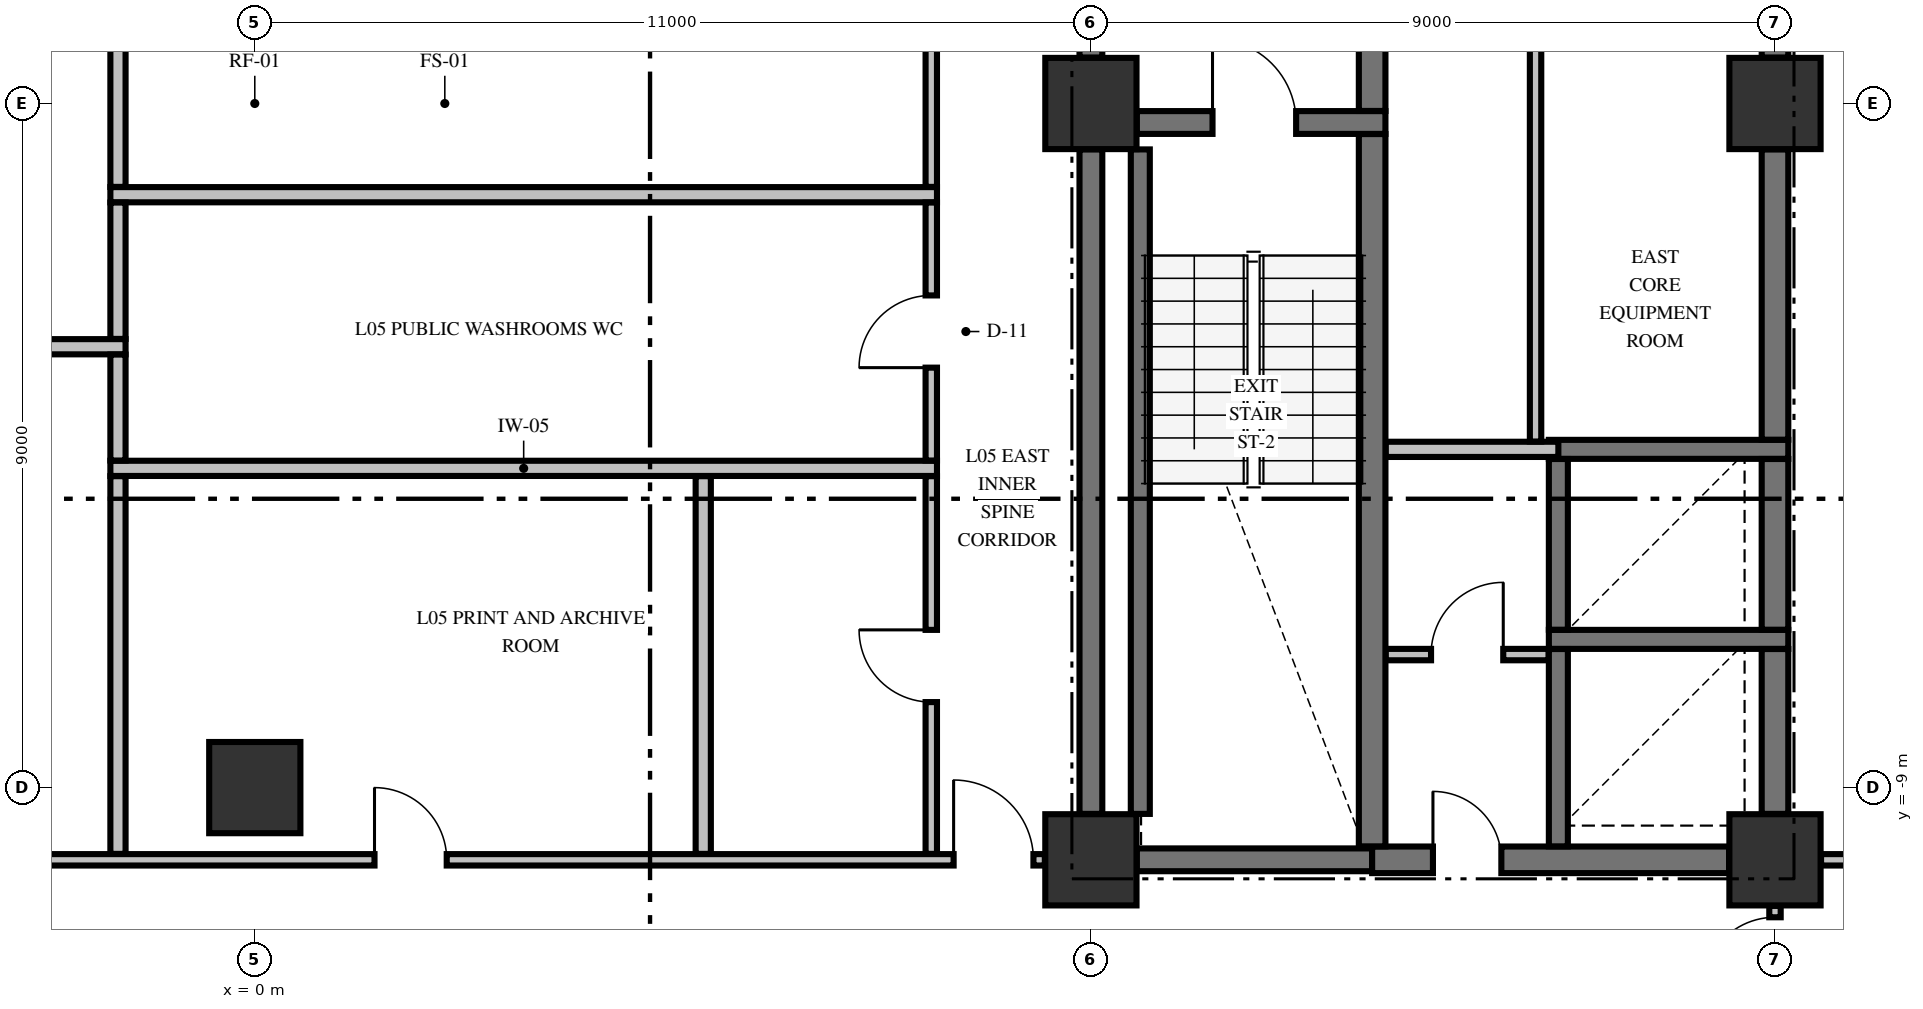
"""IFC4 building model, lengths in metres.
Left out: names, types, materials, properties, quantities, classifications, styles, units other than length and angle.
Written with IfcOpenShell. Run it as: python <this file> out.ifc"""

import sys

from ifc_helpers import new_model, si_unit, direction, frame, frame_2d, origin, origin_2d, place, context, subcontext, project, spatial, rectangle, extrude, element, fill, save


model = new_model("IFC4")
c1 = context("Model", 3, precision=1e-05, world=origin(), true_north=direction((0.0, 1.0)))
c2 = subcontext(c1, "Body", "Model", "MODEL_VIEW")
j1 = project(units=[si_unit("LENGTHUNIT", "METRE"), si_unit("PLANEANGLEUNIT", "RADIAN")], contexts=[c1])
p1 = place(None, origin())
s1 = spatial("IfcSite", under=j1, at=p1, CompositionType="ELEMENT")
p2 = place(p1, origin())
s2 = spatial("IfcBuilding", under=s1, at=p2, CompositionType="ELEMENT")
p3 = place(p2, frame((0.0, 0.0, 27.2)))
s3 = spatial("IfcBuildingStorey", under=s2, at=p3, CompositionType="ELEMENT", Elevation=27.2)
for number, where, z_axis, x_axis in (
    (1, (11.0, -9.95, -0.45), (0.0, 0.0, 1.0), (1.0, 0.0, 0.0)),
    (2, (11.0, 0.0, -0.45), (0.0, 0.0, 1.0), (1.0, 0.0, 0.0)),
    (3, (20.0, -9.95, -0.45), (0.0, 0.0, 1.0), (1.0, 0.0, 0.0)),
    (4, (0.0, -9.0, -0.45), (0.0, 0.0, 1.0), (1.0, 0.0, 0.0)),
    (5, (20.0, 0.0, -0.45), (0.0, 0.0, 1.0), (1.0, 0.0, 0.0)),
):
    element("IfcColumn", number, at=place(p3, frame(where, z_axis=z_axis, x_axis=x_axis)), inside=s3, PredefinedType="COLUMN", context=c2, shape_type="SweptSolid", body=[
        extrude(rectangle(XDim=1.2, YDim=1.2, at=origin_2d()), origin(), (0.0, 0.0, 1.0), 3.77),
    ])
p4 = place(p3, frame((11.604, -9.95, 0.0), z_axis=(0.0, 0.0, 1.0), x_axis=(1.0, 0.0, 0.0)))
e6 = element("IfcWall", 6, at=p4, inside=s3, PredefinedType="SHEAR", context=c2, shape_type="SweptSolid", body=[
    extrude(rectangle(XDim=3.096, YDim=0.3, at=frame_2d((1.548, 0.0))), origin(), (0.0, 0.0, 1.0), 3.32),
])
p5 = place(p3, frame((14.7, -9.95, 0.0), z_axis=(0.0, 0.0, 1.0), x_axis=(1.0, 0.0, 0.0)))
e7 = element("IfcWall", 7, at=p5, inside=s3, PredefinedType="SHEAR", context=c2, shape_type="SweptSolid", body=[
    extrude(rectangle(XDim=4.696, YDim=0.35, at=frame_2d((2.348, 0.0))), origin(), (0.0, 0.0, 1.0), 3.32),
])
p6 = place(p5, frame((0.8, 0.0, 0.0)))
e8 = element("IfcOpeningElement", 8, at=p6, cuts=e7, PredefinedType="OPENING", context=c2, shape_type="SweptSolid", body=[
    extrude(rectangle(XDim=0.9, YDim=2.15, at=frame_2d((0.45, 1.075))), frame((0.0, 0.185, 0.0), z_axis=(0.0, -1.0, 0.0), x_axis=(1.0, 0.0, 0.0)), (0.0, 0.0, 1.0), 0.37),
])
for number, where, z_axis, x_axis in (
    (9, (17.025, -7.05, 0.0), (0.0, 0.0, 1.0), (1.0, 0.0, 0.0)),
    (10, (17.025, -4.55, 0.0), (0.0, 0.0, 1.0), (1.0, 0.0, 0.0)),
):
    element("IfcWall", number, at=place(p3, frame(where, z_axis=z_axis, x_axis=x_axis)), inside=s3, PredefinedType="SOLIDWALL", context=c2, shape_type="SweptSolid", body=[
        extrude(rectangle(XDim=3.15, YDim=0.25, at=frame_2d((1.575, 0.0))), origin(), (0.0, 0.0, 1.0), 3.32),
    ])
p7 = place(p3, frame((11.604, -0.25, 0.0), z_axis=(0.0, 0.0, 1.0), x_axis=(1.0, 0.0, 0.0)))
e11 = element("IfcWall", 11, at=p7, inside=s3, PredefinedType="SHEAR", context=c2, shape_type="SweptSolid", body=[
    extrude(rectangle(XDim=3.271, YDim=0.3, at=frame_2d((1.635, 0.0))), origin(), (0.0, 0.0, 1.0), 3.32),
])
p8 = place(p7, frame((0.996, 0.0, 0.0)))
e12 = element("IfcOpeningElement", 12, at=p8, cuts=e11, PredefinedType="OPENING", context=c2, shape_type="SweptSolid", body=[
    extrude(rectangle(XDim=1.1, YDim=2.15, at=frame_2d((0.55, 1.075))), frame((0.0, 0.16, 0.0), z_axis=(0.0, -1.0, 0.0), x_axis=(1.0, 0.0, 0.0)), (0.0, 0.0, 1.0), 0.32),
])
p9 = place(p3, frame((-10.394, -9.95, 0.0), z_axis=(0.0, 0.0, 1.0), x_axis=(1.0, 0.0, 0.0)))
e13 = element("IfcWall", 13, at=p9, inside=s3, PredefinedType="PARTITIONING", context=c2, shape_type="SweptSolid", body=[
    extrude(rectangle(XDim=20.788, YDim=0.15, at=frame_2d((10.394, 0.0))), origin(), (0.0, 0.0, 1.0), 3.32),
])
p10 = place(p9, frame((0.15, 0.0, 0.0)))
e14 = element("IfcOpeningElement", 14, at=p10, cuts=e13, PredefinedType="OPENING", context=c2, shape_type="SweptSolid", body=[
    extrude(rectangle(XDim=1.05, YDim=2.15, at=frame_2d((0.525, 1.075))), frame((0.0, 0.085, 0.0), z_axis=(0.0, -1.0, 0.0), x_axis=(1.0, 0.0, 0.0)), (0.0, 0.0, 1.0), 0.17),
])
p11 = place(p9, frame((19.588, 0.0, 0.0)))
e15 = element("IfcOpeningElement", 15, at=p11, cuts=e13, PredefinedType="OPENING", context=c2, shape_type="SweptSolid", body=[
    extrude(rectangle(XDim=1.05, YDim=2.15, at=frame_2d((0.525, 1.075))), frame((0.0, 0.085, 0.0), z_axis=(0.0, -1.0, 0.0), x_axis=(1.0, 0.0, 0.0)), (0.0, 0.0, 1.0), 0.17),
])
p12 = place(p9, frame((11.969, 0.0, 0.0)))
e16 = element("IfcOpeningElement", 16, at=p12, cuts=e13, PredefinedType="OPENING", context=c2, shape_type="SweptSolid", body=[
    extrude(rectangle(XDim=0.95, YDim=2.15, at=frame_2d((0.475, 1.075))), frame((0.0, 0.085, 0.0), z_axis=(0.0, -1.0, 0.0), x_axis=(1.0, 0.0, 0.0)), (0.0, 0.0, 1.0), 0.17),
])
p13 = place(p3, frame((20.606, -9.95, 0.0), z_axis=(0.0, 0.0, 1.0), x_axis=(1.0, 0.0, 0.0)))
e17 = element("IfcWall", 17, at=p13, inside=s3, PredefinedType="PARTITIONING", context=c2, shape_type="SweptSolid", body=[
    extrude(rectangle(XDim=8.229, YDim=0.15, at=frame_2d((4.115, 0.0))), origin(), (0.0, 0.0, 1.0), 3.32),
])
p14 = place(p13, frame((3.394, 0.0, 0.0)))
e18 = element("IfcOpeningElement", 18, at=p14, cuts=e17, PredefinedType="OPENING", context=c2, shape_type="SweptSolid", body=[
    extrude(rectangle(XDim=1.0, YDim=2.15, at=frame_2d((0.5, 1.075))), frame((0.0, 0.085, 0.0), z_axis=(0.0, -1.0, 0.0), x_axis=(1.0, 0.0, 0.0)), (0.0, 0.0, 1.0), 0.17),
])
p15 = place(p3, frame((14.878, -7.25, 0.0), z_axis=(0.0, 0.0, 1.0), x_axis=(1.0, 0.0, 0.0)))
e19 = element("IfcWall", 19, at=p15, inside=s3, PredefinedType="PARTITIONING", context=c2, shape_type="SweptSolid", body=[
    extrude(rectangle(XDim=2.144, YDim=0.15, at=frame_2d((1.072, 0.0))), origin(), (0.0, 0.0, 1.0), 3.32),
])
p16 = place(p15, frame((0.597, 0.0, 0.0)))
e20 = element("IfcOpeningElement", 20, at=p16, cuts=e19, PredefinedType="OPENING", context=c2, shape_type="SweptSolid", body=[
    extrude(rectangle(XDim=0.95, YDim=2.15, at=frame_2d((0.475, 1.075))), frame((0.0, 0.085, 0.0), z_axis=(0.0, -1.0, 0.0), x_axis=(1.0, 0.0, 0.0)), (0.0, 0.0, 1.0), 0.17),
])
p17 = place(p3, frame((-1.9, -4.8, 0.0), z_axis=(0.0, 0.0, 1.0), x_axis=(1.0, 0.0, 0.0)))
e21 = element("IfcWall", 21, at=p17, inside=s3, PredefinedType="PARTITIONING", context=c2, shape_type="SweptSolid", body=[
    extrude(rectangle(XDim=10.875, YDim=0.2, at=frame_2d((5.438, 0.0))), origin(), (0.0, 0.0, 1.0), 3.32),
])
p18 = place(p3, frame((14.878, -4.55, 0.0), z_axis=(0.0, 0.0, 1.0), x_axis=(1.0, 0.0, 0.0)))
e22 = element("IfcWall", 22, at=p18, inside=s3, PredefinedType="PARTITIONING", context=c2, shape_type="SweptSolid", body=[
    extrude(rectangle(XDim=2.272, YDim=0.2, at=frame_2d((1.136, 0.0))), origin(), (0.0, 0.0, 1.0), 3.32),
])
p19 = place(p3, frame((-8.975, -3.2, 0.0), z_axis=(0.0, 0.0, 1.0), x_axis=(1.0, 0.0, 0.0)))
e23 = element("IfcWall", 23, at=p19, inside=s3, PredefinedType="PARTITIONING", context=c2, shape_type="SweptSolid", body=[
    extrude(rectangle(XDim=7.275, YDim=0.2, at=frame_2d((3.638, 0.0))), origin(), (0.0, 0.0, 1.0), 3.32),
])
p20 = place(p3, frame((-1.9, -1.2, 0.0), z_axis=(0.0, 0.0, 1.0), x_axis=(1.0, 0.0, 0.0)))
e24 = element("IfcWall", 24, at=p20, inside=s3, PredefinedType="PARTITIONING", context=c2, shape_type="SweptSolid", body=[
    extrude(rectangle(XDim=10.875, YDim=0.2, at=frame_2d((5.438, 0.0))), origin(), (0.0, 0.0, 1.0), 3.32),
])
p21 = place(p3, frame((11.0, -9.346, 0.0), z_axis=(0.0, 0.0, 1.0), x_axis=(0.0, 1.0, 0.0)))
e25 = element("IfcWall", 25, at=p21, inside=s3, PredefinedType="SHEAR", context=c2, shape_type="SweptSolid", body=[
    extrude(rectangle(XDim=8.742, YDim=0.3, at=frame_2d((4.371, 0.0))), origin(), (0.0, 0.0, 1.0), 3.32),
])
p22 = place(p3, frame((11.0, 0.604, 0.0), z_axis=(0.0, 0.0, 1.0), x_axis=(0.0, 1.0, 0.0)))
e26 = element("IfcWall", 26, at=p22, inside=s3, PredefinedType="SHEAR", context=c2, shape_type="SweptSolid", body=[
    extrude(rectangle(XDim=2.144, YDim=0.3, at=frame_2d((1.072, 0.0))), origin(), (0.0, 0.0, 1.0), 3.32),
])
p23 = place(p22, frame((0.496, 0.0, 0.0)))
e27 = element("IfcOpeningElement", 27, at=p23, cuts=e26, PredefinedType="OPENING", context=c2, shape_type="SweptSolid", body=[
    extrude(rectangle(XDim=1.1, YDim=2.15, at=frame_2d((0.55, 1.075))), frame((0.0, 0.16, 0.0), z_axis=(0.0, -1.0, 0.0), x_axis=(1.0, 0.0, 0.0)), (0.0, 0.0, 1.0), 0.32),
])
p24 = place(p3, frame((11.65, -9.346, 0.0), z_axis=(0.0, 0.0, 1.0), x_axis=(0.0, 1.0, 0.0)))
e28 = element("IfcWall", 28, at=p24, inside=s3, PredefinedType="SOLIDWALL", context=c2, shape_type="SweptSolid", body=[
    extrude(rectangle(XDim=8.742, YDim=0.25, at=frame_2d((4.371, 0.0))), origin(), (0.0, 0.0, 1.0), 3.32),
])
p25 = place(p3, frame((14.7, -9.773, 0.0), z_axis=(0.0, 0.0, 1.0), x_axis=(0.0, 1.0, 0.0)))
e29 = element("IfcWall", 29, at=p25, inside=s3, PredefinedType="SHEAR", context=c2, shape_type="SweptSolid", body=[
    extrude(rectangle(XDim=9.371, YDim=0.35, at=frame_2d((4.686, 0.0))), origin(), (0.0, 0.0, 1.0), 3.32),
])
p26 = place(p3, frame((14.7, -0.098, 0.0), z_axis=(0.0, 0.0, 1.0), x_axis=(0.0, 1.0, 0.0)))
e30 = element("IfcWall", 30, at=p26, inside=s3, PredefinedType="SHEAR", context=c2, shape_type="SweptSolid", body=[
    extrude(rectangle(XDim=2.846, YDim=0.35, at=frame_2d((1.423, 0.0))), origin(), (0.0, 0.0, 1.0), 3.32),
])
p27 = place(p3, frame((17.15, -9.773, 0.0), z_axis=(0.0, 0.0, 1.0), x_axis=(0.0, 1.0, 0.0)))
e31 = element("IfcWall", 31, at=p27, inside=s3, PredefinedType="SOLIDWALL", context=c2, shape_type="SweptSolid", body=[
    extrude(rectangle(XDim=2.596, YDim=0.25, at=frame_2d((1.298, 0.0))), origin(), (0.0, 0.0, 1.0), 3.32),
])
p28 = place(p3, frame((17.15, -6.923, 0.0), z_axis=(0.0, 0.0, 1.0), x_axis=(0.0, 1.0, 0.0)))
e32 = element("IfcWall", 32, at=p28, inside=s3, PredefinedType="SOLIDWALL", context=c2, shape_type="SweptSolid", body=[
    extrude(rectangle(XDim=2.246, YDim=0.25, at=frame_2d((1.123, 0.0))), origin(), (0.0, 0.0, 1.0), 3.32),
])
p29 = place(p3, frame((20.0, -9.346, 0.0), z_axis=(0.0, 0.0, 1.0), x_axis=(0.0, 1.0, 0.0)))
e33 = element("IfcWall", 33, at=p29, inside=s3, PredefinedType="SHEAR", context=c2, shape_type="SweptSolid", body=[
    extrude(rectangle(XDim=2.169, YDim=0.35, at=frame_2d((1.084, 0.0))), origin(), (0.0, 0.0, 1.0), 3.32),
])
p30 = place(p3, frame((20.0, -6.923, 0.0), z_axis=(0.0, 0.0, 1.0), x_axis=(0.0, 1.0, 0.0)))
e34 = element("IfcWall", 34, at=p30, inside=s3, PredefinedType="SHEAR", context=c2, shape_type="SweptSolid", body=[
    extrude(rectangle(XDim=2.246, YDim=0.35, at=frame_2d((1.123, 0.0))), origin(), (0.0, 0.0, 1.0), 3.32),
])
p31 = place(p3, frame((20.0, -4.423, 0.0), z_axis=(0.0, 0.0, 1.0), x_axis=(0.0, 1.0, 0.0)))
e35 = element("IfcWall", 35, at=p31, inside=s3, PredefinedType="SHEAR", context=c2, shape_type="SweptSolid", body=[
    extrude(rectangle(XDim=3.819, YDim=0.35, at=frame_2d((1.91, 0.0))), origin(), (0.0, 0.0, 1.0), 3.32),
])
p32 = place(p3, frame((20.0, 0.604, 0.0), z_axis=(0.0, 0.0, 1.0), x_axis=(0.0, 1.0, 0.0)))
e36 = element("IfcWall", 36, at=p32, inside=s3, PredefinedType="SHEAR", context=c2, shape_type="SweptSolid", body=[
    extrude(rectangle(XDim=9.292, YDim=0.35, at=frame_2d((4.646, 0.0))), origin(), (0.0, 0.0, 1.0), 3.32),
])
p33 = place(p3, frame((-1.8, -9.872, 0.0), z_axis=(0.0, 0.0, 1.0), x_axis=(0.0, 1.0, 0.0)))
e37 = element("IfcWall", 37, at=p33, inside=s3, PredefinedType="PARTITIONING", context=c2, shape_type="SweptSolid", body=[
    extrude(rectangle(XDim=4.969, YDim=0.2, at=frame_2d((2.484, 0.0))), origin(), (0.0, 0.0, 1.0), 3.32),
])
p34 = place(p3, frame((-1.8, -4.697, 0.0), z_axis=(0.0, 0.0, 1.0), x_axis=(0.0, 1.0, 0.0)))
e38 = element("IfcWall", 38, at=p34, inside=s3, PredefinedType="PARTITIONING", context=c2, shape_type="SweptSolid", body=[
    extrude(rectangle(XDim=1.394, YDim=0.2, at=frame_2d((0.697, 0.0))), origin(), (0.0, 0.0, 1.0), 3.32),
])
p35 = place(p3, frame((-1.8, -3.097, 0.0), z_axis=(0.0, 0.0, 1.0), x_axis=(0.0, 1.0, 0.0)))
e39 = element("IfcWall", 39, at=p35, inside=s3, PredefinedType="PARTITIONING", context=c2, shape_type="SweptSolid", body=[
    extrude(rectangle(XDim=1.794, YDim=0.2, at=frame_2d((0.897, 0.0))), origin(), (0.0, 0.0, 1.0), 3.32),
])
p36 = place(p3, frame((-1.8, -1.097, 0.0), z_axis=(0.0, 0.0, 1.0), x_axis=(0.0, 1.0, 0.0)))
e40 = element("IfcWall", 40, at=p36, inside=s3, PredefinedType="PARTITIONING", context=c2, shape_type="SweptSolid", body=[
    extrude(rectangle(XDim=11.519, YDim=0.2, at=frame_2d((5.76, 0.0))), origin(), (0.0, 0.0, 1.0), 3.32),
])
p37 = place(p3, frame((5.9, -9.872, 0.0), z_axis=(0.0, 0.0, 1.0), x_axis=(0.0, 1.0, 0.0)))
e41 = element("IfcWall", 41, at=p37, inside=s3, PredefinedType="PARTITIONING", context=c2, shape_type="SweptSolid", body=[
    extrude(rectangle(XDim=4.969, YDim=0.2, at=frame_2d((2.484, 0.0))), origin(), (0.0, 0.0, 1.0), 3.32),
])
p38 = place(p3, frame((8.9, -9.872, 0.0), z_axis=(0.0, 0.0, 1.0), x_axis=(0.0, 1.0, 0.0)))
e42 = element("IfcWall", 42, at=p38, inside=s3, PredefinedType="PARTITIONING", context=c2, shape_type="SweptSolid", body=[
    extrude(rectangle(XDim=4.969, YDim=0.15, at=frame_2d((2.484, 0.0))), origin(), (0.0, 0.0, 1.0), 3.32),
])
p39 = place(p38, frame((1.997, 0.0, 0.0)))
e43 = element("IfcOpeningElement", 43, at=p39, cuts=e42, PredefinedType="OPENING", context=c2, shape_type="SweptSolid", body=[
    extrude(rectangle(XDim=0.95, YDim=2.15, at=frame_2d((0.475, 1.075))), frame((0.0, 0.085, 0.0), z_axis=(0.0, -1.0, 0.0), x_axis=(1.0, 0.0, 0.0)), (0.0, 0.0, 1.0), 0.17),
])
p40 = place(p3, frame((8.9, -4.697, 0.0), z_axis=(0.0, 0.0, 1.0), x_axis=(0.0, 1.0, 0.0)))
e44 = element("IfcWall", 44, at=p40, inside=s3, PredefinedType="PARTITIONING", context=c2, shape_type="SweptSolid", body=[
    extrude(rectangle(XDim=3.394, YDim=0.15, at=frame_2d((1.697, 0.0))), origin(), (0.0, 0.0, 1.0), 3.32),
])
p41 = place(p40, frame((1.222, 0.0, 0.0)))
e45 = element("IfcOpeningElement", 45, at=p41, cuts=e44, PredefinedType="OPENING", context=c2, shape_type="SweptSolid", body=[
    extrude(rectangle(XDim=0.95, YDim=2.15, at=frame_2d((0.475, 1.075))), frame((0.0, 0.085, 0.0), z_axis=(0.0, -1.0, 0.0), x_axis=(1.0, 0.0, 0.0)), (0.0, 0.0, 1.0), 0.17),
])
p42 = place(p3, frame((8.9, -1.097, 0.0), z_axis=(0.0, 0.0, 1.0), x_axis=(0.0, 1.0, 0.0)))
e46 = element("IfcWall", 46, at=p42, inside=s3, PredefinedType="PARTITIONING", context=c2, shape_type="SweptSolid", body=[
    extrude(rectangle(XDim=11.519, YDim=0.15, at=frame_2d((5.76, 0.0))), origin(), (0.0, 0.0, 1.0), 3.32),
])
p43 = place(p42, frame((5.197, 0.0, 0.0)))
e47 = element("IfcOpeningElement", 47, at=p43, cuts=e46, PredefinedType="OPENING", context=c2, shape_type="SweptSolid", body=[
    extrude(rectangle(XDim=1.1, YDim=2.15, at=frame_2d((0.55, 1.075))), frame((0.0, 0.085, 0.0), z_axis=(0.0, -1.0, 0.0), x_axis=(1.0, 0.0, 0.0)), (0.0, 0.0, 1.0), 0.17),
])
p44 = place(p3, frame((16.85, -4.447, 0.0), z_axis=(0.0, 0.0, 1.0), x_axis=(0.0, 1.0, 0.0)))
e48 = element("IfcWall", 48, at=p44, inside=s3, PredefinedType="PARTITIONING", context=c2, shape_type="SweptSolid", body=[
    extrude(rectangle(XDim=7.369, YDim=0.15, at=frame_2d((3.685, 0.0))), origin(), (0.0, 0.0, 1.0), 3.32),
])
p45 = place(p3, frame((20.0, -12.122, 0.0), z_axis=(0.0, 0.0, 1.0), x_axis=(0.0, 1.0, 0.0)))
e49 = element("IfcWall", 49, at=p45, inside=s3, PredefinedType="PARTITIONING", context=c2, shape_type="SweptSolid", body=[
    extrude(rectangle(XDim=1.566, YDim=0.15, at=frame_2d((0.783, 0.0))), origin(), (0.0, 0.0, 1.0), 2.66),
])
p46 = place(p45, frame((0.466, 0.0, 0.0)))
e50 = element("IfcOpeningElement", 50, at=p46, cuts=e49, PredefinedType="OPENING", context=c2, shape_type="SweptSolid", body=[
    extrude(rectangle(XDim=0.95, YDim=2.15, at=frame_2d((0.475, 1.075))), frame((0.0, 0.085, 0.0), z_axis=(0.0, -1.0, 0.0), x_axis=(1.0, 0.0, 0.0)), (0.0, 0.0, 1.0), 0.17),
])
p47 = place(p8, origin())
e51 = element("IfcDoor", 51, at=p47, inside=s3, OperationType="SINGLE_SWING_LEFT", PredefinedType="DOOR", context=c2, shape_type="SweptSolid", body=[
    extrude(rectangle(XDim=1.1, YDim=2.15, at=frame_2d((0.55, 1.075))), frame((0.0, 0.025, 0.0), z_axis=(0.0, -1.0, 0.0), x_axis=(1.0, 0.0, 0.0)), (0.0, 0.0, 1.0), 0.05),
])
fill(e12, e51)
p48 = place(p6, origin())
e52 = element("IfcDoor", 52, at=p48, inside=s3, OperationType="SINGLE_SWING_LEFT", PredefinedType="DOOR", context=c2, shape_type="SweptSolid", body=[
    extrude(rectangle(XDim=0.9, YDim=2.15, at=frame_2d((0.45, 1.075))), frame((0.0, 0.025, 0.0), z_axis=(0.0, -1.0, 0.0), x_axis=(1.0, 0.0, 0.0)), (0.0, 0.0, 1.0), 0.05),
])
fill(e8, e52)
p49 = place(p16, origin())
e53 = element("IfcDoor", 53, at=p49, inside=s3, OperationType="SINGLE_SWING_RIGHT", PredefinedType="DOOR", context=c2, shape_type="SweptSolid", body=[
    extrude(rectangle(XDim=0.95, YDim=2.15, at=frame_2d((0.475, 1.075))), frame((0.0, 0.025, 0.0), z_axis=(0.0, -1.0, 0.0), x_axis=(1.0, 0.0, 0.0)), (0.0, 0.0, 1.0), 0.05),
])
fill(e20, e53)
p50 = place(p11, origin())
e54 = element("IfcDoor", 54, at=p50, inside=s3, OperationType="SINGLE_SWING_LEFT", PredefinedType="DOOR", context=c2, shape_type="SweptSolid", body=[
    extrude(rectangle(XDim=1.05, YDim=2.15, at=frame_2d((0.525, 1.075))), frame((0.0, 0.025, 0.0), z_axis=(0.0, -1.0, 0.0), x_axis=(1.0, 0.0, 0.0)), (0.0, 0.0, 1.0), 0.05),
])
fill(e15, e54)
p51 = place(p41, origin())
e55 = element("IfcDoor", 55, at=p51, inside=s3, OperationType="SINGLE_SWING_LEFT", PredefinedType="DOOR", context=c2, shape_type="SweptSolid", body=[
    extrude(rectangle(XDim=0.95, YDim=2.15, at=frame_2d((0.475, 1.075))), frame((0.0, 0.025, 0.0), z_axis=(0.0, -1.0, 0.0), x_axis=(1.0, 0.0, 0.0)), (0.0, 0.0, 1.0), 0.05),
])
fill(e45, e55)
p52 = place(p39, origin())
e56 = element("IfcDoor", 56, at=p52, inside=s3, OperationType="SINGLE_SWING_RIGHT", PredefinedType="DOOR", context=c2, shape_type="SweptSolid", body=[
    extrude(rectangle(XDim=0.95, YDim=2.15, at=frame_2d((0.475, 1.075))), frame((0.0, 0.025, 0.0), z_axis=(0.0, -1.0, 0.0), x_axis=(1.0, 0.0, 0.0)), (0.0, 0.0, 1.0), 0.05),
])
fill(e43, e56)
p53 = place(p12, origin())
e57 = element("IfcDoor", 57, at=p53, inside=s3, OperationType="SINGLE_SWING_LEFT", PredefinedType="DOOR", context=c2, shape_type="SweptSolid", body=[
    extrude(rectangle(XDim=0.95, YDim=2.15, at=frame_2d((0.475, 1.075))), frame((0.0, 0.025, 0.0), z_axis=(0.0, -1.0, 0.0), x_axis=(1.0, 0.0, 0.0)), (0.0, 0.0, 1.0), 0.05),
])
fill(e16, e57)
p54 = place(p46, origin())
e58 = element("IfcDoor", 58, at=p54, inside=s3, OperationType="SINGLE_SWING_LEFT", PredefinedType="DOOR", context=c2, shape_type="SweptSolid", body=[
    extrude(rectangle(XDim=0.95, YDim=2.15, at=frame_2d((0.475, 1.075))), frame((0.0, 0.025, 0.0), z_axis=(0.0, -1.0, 0.0), x_axis=(1.0, 0.0, 0.0)), (0.0, 0.0, 1.0), 0.05),
])
fill(e50, e58)
save(model, sys.argv[1])
